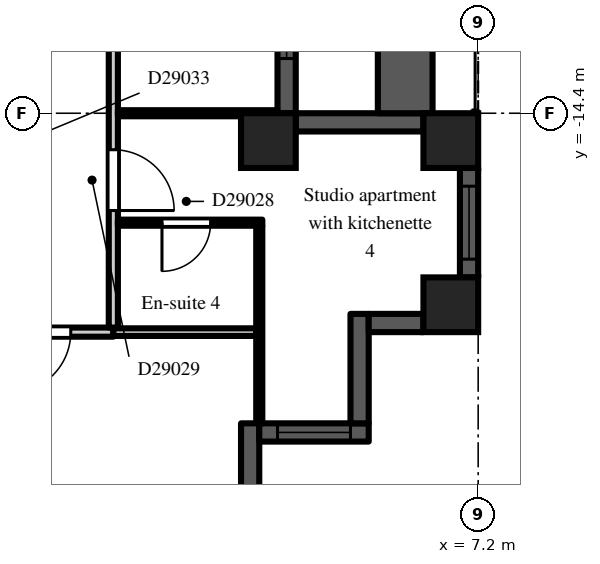
"""IFC4 building model, lengths in metres.
Left out: names, types, materials, properties, quantities, classifications, styles, units other than length and angle.
Written with IfcOpenShell. Run it as: python <this file> out.ifc"""

import sys

from ifc_helpers import new_model, si_unit, direction, frame, frame_2d, origin, origin_2d, place, context, subcontext, project, spatial, rectangle, extrude, element, fill, save


model = new_model("IFC4")
c1 = context("Model", 3, precision=1e-05, world=origin(), true_north=direction((0.0, 1.0)))
c2 = subcontext(c1, "Body", "Model", "MODEL_VIEW")
j1 = project(units=[si_unit("LENGTHUNIT", "METRE"), si_unit("PLANEANGLEUNIT", "RADIAN")], contexts=[c1])
p1 = place(None, origin())
s1 = spatial("IfcSite", under=j1, at=p1, CompositionType="ELEMENT")
p2 = place(p1, origin())
s2 = spatial("IfcBuilding", under=s1, at=p2, CompositionType="ELEMENT")
p3 = place(p2, frame((0.0, 0.0, 198.9)))
s3 = spatial("IfcBuildingStorey", under=s2, at=p3, CompositionType="ELEMENT", Elevation=198.9)
for number, where, z_axis, x_axis in (
    (1, (3.75, -14.85, 0.0), (0.0, 0.0, 1.0), (1.0, 0.0, 0.0)),
    (2, (6.75, -17.55, 0.0), (0.0, 0.0, 1.0), (1.0, 0.0, 0.0)),
    (3, (6.75, -14.85, 0.0), (0.0, 0.0, 1.0), (1.0, 0.0, 0.0)),
):
    element("IfcColumn", number, at=place(p3, frame(where, z_axis=z_axis, x_axis=x_axis)), inside=s3, PredefinedType="COLUMN", context=c2, shape_type="SweptSolid", body=[
        extrude(rectangle(XDim=0.9, YDim=0.9, at=origin_2d()), origin(), (0.0, 0.0, 1.0), 3.0),
    ])
p4 = place(p3, frame((3.45, -20.7, 0.0), z_axis=(0.0, 0.0, 1.0), x_axis=(0.0, 1.0, 0.0)))
e4 = element("IfcWall", 4, at=p4, inside=s3, PredefinedType="SOLIDWALL", context=c2, shape_type="SweptSolid", body=[
    extrude(rectangle(XDim=1.2, YDim=0.3, at=frame_2d((0.6, 0.0))), origin(), (0.0, 0.0, 1.0), 2.6),
])
p5 = place(p3, frame((3.6, -19.65, 0.0), z_axis=(0.0, 0.0, 1.0), x_axis=(1.0, 0.0, 0.0)))
e5 = element("IfcWall", 5, at=p5, inside=s3, PredefinedType="SOLIDWALL", context=c2, shape_type="SweptSolid", body=[
    extrude(rectangle(XDim=1.8, YDim=0.3, at=frame_2d((0.9, 0.0))), origin(), (0.0, 0.0, 1.0), 2.6),
])
p6 = place(p5, frame((0.3, 0.0, 0.2)))
e6 = element("IfcOpeningElement", 6, at=p6, cuts=e5, PredefinedType="OPENING", context=c2, shape_type="SweptSolid", body=[
    extrude(rectangle(XDim=1.2, YDim=1.85, at=frame_2d((0.6, 0.925))), frame((0.0, 0.16, 0.0), z_axis=(0.0, -1.0, 0.0), x_axis=(1.0, 0.0, 0.0)), (0.0, 0.0, 1.0), 0.32),
])
p7 = place(p3, frame((5.25, -19.5, 0.0), z_axis=(0.0, 0.0, 1.0), x_axis=(0.0, 1.0, 0.0)))
e7 = element("IfcWall", 7, at=p7, inside=s3, PredefinedType="SOLIDWALL", context=c2, shape_type="SweptSolid", body=[
    extrude(rectangle(XDim=1.8, YDim=0.3, at=frame_2d((0.9, 0.0))), origin(), (0.0, 0.0, 1.0), 2.6),
])
p8 = place(p3, frame((5.4, -17.85, 0.0), z_axis=(0.0, 0.0, 1.0), x_axis=(1.0, 0.0, 0.0)))
e8 = element("IfcWall", 8, at=p8, inside=s3, PredefinedType="SOLIDWALL", context=c2, shape_type="SweptSolid", body=[
    extrude(rectangle(XDim=0.9, YDim=0.3, at=frame_2d((0.45, 0.0))), origin(), (0.0, 0.0, 1.0), 2.6),
])
p9 = place(p3, frame((7.05, -17.1, 0.0), z_axis=(0.0, 0.0, 1.0), x_axis=(0.0, 1.0, 0.0)))
e9 = element("IfcWall", 9, at=p9, inside=s3, PredefinedType="SOLIDWALL", context=c2, shape_type="SweptSolid", body=[
    extrude(rectangle(XDim=1.8, YDim=0.3, at=frame_2d((0.9, 0.0))), origin(), (0.0, 0.0, 1.0), 2.3),
])
p10 = place(p9, frame((0.3, 0.0, 0.2)))
e10 = element("IfcOpeningElement", 10, at=p10, cuts=e9, PredefinedType="OPENING", context=c2, shape_type="SweptSolid", body=[
    extrude(rectangle(XDim=1.2, YDim=1.85, at=frame_2d((0.6, 0.925))), frame((0.0, 0.16, 0.0), z_axis=(0.0, -1.0, 0.0), x_axis=(1.0, 0.0, 0.0)), (0.0, 0.0, 1.0), 0.32),
])
p11 = place(p3, frame((6.3, -14.55, 0.0), z_axis=(0.0, 0.0, 1.0), x_axis=(-1.0, 0.0, 0.0)))
e11 = element("IfcWall", 11, at=p11, inside=s3, PredefinedType="SOLIDWALL", context=c2, shape_type="SweptSolid", body=[
    extrude(rectangle(XDim=2.1, YDim=0.3, at=frame_2d((1.05, 0.0))), origin(), (0.0, 0.0, 1.0), 2.3),
])
p12 = place(p3, frame((4.05, -14.4, 0.0), z_axis=(0.0, 0.0, 1.0), x_axis=(0.0, 1.0, 0.0)))
e12 = element("IfcWall", 12, at=p12, inside=s3, PredefinedType="SOLIDWALL", context=c2, shape_type="SweptSolid", body=[
    extrude(rectangle(XDim=7.2, YDim=0.3, at=frame_2d((3.6, 0.0))), origin(), (0.0, 0.0, 1.0), 2.3),
])
p13 = place(p12, frame((3.0, 0.0, 0.0)))
e13 = element("IfcOpeningElement", 13, at=p13, cuts=e12, PredefinedType="OPENING", context=c2, shape_type="SweptSolid", body=[
    extrude(rectangle(XDim=1.2, YDim=2.05, at=frame_2d((0.6, 1.025))), frame((0.0, 0.16, 0.0), z_axis=(0.0, -1.0, 0.0), x_axis=(1.0, 0.0, 0.0)), (0.0, 0.0, 1.0), 0.32),
])
p14 = place(p12, frame((0.9, 0.0, 0.2)))
e14 = element("IfcOpeningElement", 14, at=p14, cuts=e12, PredefinedType="OPENING", context=c2, shape_type="SweptSolid", body=[
    extrude(rectangle(XDim=1.8, YDim=1.85, at=frame_2d((0.9, 0.925))), frame((0.0, 0.16, 0.0), z_axis=(0.0, -1.0, 0.0), x_axis=(1.0, 0.0, 0.0)), (0.0, 0.0, 1.0), 0.32),
])
p15 = place(p12, frame((4.5, 0.0, 0.2)))
e15 = element("IfcOpeningElement", 15, at=p15, cuts=e12, PredefinedType="OPENING", context=c2, shape_type="SweptSolid", body=[
    extrude(rectangle(XDim=1.8, YDim=1.85, at=frame_2d((0.9, 0.925))), frame((0.0, 0.16, 0.0), z_axis=(0.0, -1.0, 0.0), x_axis=(1.0, 0.0, 0.0)), (0.0, 0.0, 1.0), 0.32),
])
p16 = place(p3, frame((6.0, -14.4, 0.0), z_axis=(0.0, 0.0, 1.0), x_axis=(0.0, 1.0, 0.0)))
e16 = element("IfcWall", 16, at=p16, inside=s3, PredefinedType="PARAPET", context=c2, shape_type="SweptSolid", body=[
    extrude(rectangle(XDim=7.2, YDim=0.9, at=frame_2d((3.6, 0.0))), origin(), (0.0, 0.0, 1.0), 0.8),
])
p17 = place(p3, frame((-1.2, -18.0, 0.0), z_axis=(0.0, 0.0, 1.0), x_axis=(1.0, 0.0, 0.0)))
e17 = element("IfcWall", 17, at=p17, inside=s3, PredefinedType="PARTITIONING", context=c2, shape_type="SweptSolid", body=[
    extrude(rectangle(XDim=2.4, YDim=0.15, at=frame_2d((1.2, 0.0))), origin(), (0.0, 0.0, 1.0), 2.6),
])
p18 = place(p17, frame((0.7, 0.0, 0.0)))
e18 = element("IfcOpeningElement", 18, at=p18, cuts=e17, PredefinedType="OPENING", context=c2, shape_type="SweptSolid", body=[
    extrude(rectangle(XDim=1.0, YDim=2.1, at=frame_2d((0.5, 1.05))), frame((0.0, 0.085, 0.0), z_axis=(0.0, -1.0, 0.0), x_axis=(1.0, 0.0, 0.0)), (0.0, 0.0, 1.0), 0.17),
])
p19 = place(p3, frame((1.2, -17.925, 0.0), z_axis=(0.0, 0.0, 1.0), x_axis=(0.0, 1.0, 0.0)))
e19 = element("IfcWall", 19, at=p19, inside=s3, PredefinedType="PARTITIONING", context=c2, shape_type="SweptSolid", body=[
    extrude(rectangle(XDim=16.8, YDim=0.15, at=frame_2d((8.4, 0.0))), origin(), (0.0, 0.0, 1.0), 2.6),
])
p20 = place(p19, frame((15.075, 0.0, 0.0)))
e20 = element("IfcOpeningElement", 20, at=p20, cuts=e19, PredefinedType="OPENING", context=c2, shape_type="SweptSolid", body=[
    extrude(rectangle(XDim=0.9, YDim=2.1, at=frame_2d((0.45, 1.05))), frame((0.0, 0.085, 0.0), z_axis=(0.0, -1.0, 0.0), x_axis=(1.0, 0.0, 0.0)), (0.0, 0.0, 1.0), 0.17),
])
p21 = place(p19, frame((12.075, 0.0, 0.0)))
e21 = element("IfcOpeningElement", 21, at=p21, cuts=e19, PredefinedType="OPENING", context=c2, shape_type="SweptSolid", body=[
    extrude(rectangle(XDim=0.9, YDim=2.1, at=frame_2d((0.45, 1.05))), frame((0.0, 0.085, 0.0), z_axis=(0.0, -1.0, 0.0), x_axis=(1.0, 0.0, 0.0)), (0.0, 0.0, 1.0), 0.17),
])
p22 = place(p19, frame((4.875, 0.0, 0.0)))
e22 = element("IfcOpeningElement", 22, at=p22, cuts=e19, PredefinedType="OPENING", context=c2, shape_type="SweptSolid", body=[
    extrude(rectangle(XDim=0.9, YDim=2.1, at=frame_2d((0.45, 1.05))), frame((0.0, 0.085, 0.0), z_axis=(0.0, -1.0, 0.0), x_axis=(1.0, 0.0, 0.0)), (0.0, 0.0, 1.0), 0.17),
])
p23 = place(p19, frame((1.925, 0.0, 0.0)))
e23 = element("IfcOpeningElement", 23, at=p23, cuts=e19, PredefinedType="OPENING", context=c2, shape_type="SweptSolid", body=[
    extrude(rectangle(XDim=1.0, YDim=2.1, at=frame_2d((0.5, 1.05))), frame((0.0, 0.085, 0.0), z_axis=(0.0, -1.0, 0.0), x_axis=(1.0, 0.0, 0.0)), (0.0, 0.0, 1.0), 0.17),
])
p24 = place(p3, frame((1.2, -18.0, 0.0), z_axis=(0.0, 0.0, 1.0), x_axis=(1.0, 0.0, 0.0)))
e24 = element("IfcWall", 24, at=p24, inside=s3, PredefinedType="PARTITIONING", context=c2, shape_type="SweptSolid", body=[
    extrude(rectangle(XDim=2.35, YDim=0.125, at=frame_2d((1.175, 0.0))), origin(), (0.0, 0.0, 1.0), 2.6),
])
p25 = place(p3, frame((1.275, -16.2, 0.0), z_axis=(0.0, 0.0, 1.0), x_axis=(1.0, 0.0, 0.0)))
e25 = element("IfcWall", 25, at=p25, inside=s3, PredefinedType="PARTITIONING", context=c2, shape_type="SweptSolid", body=[
    extrude(rectangle(XDim=2.375, YDim=0.1, at=frame_2d((1.188, 0.0))), origin(), (0.0, 0.0, 1.0), 2.6),
])
p26 = place(p25, frame((0.725, 0.0, 0.0)))
e26 = element("IfcOpeningElement", 26, at=p26, cuts=e25, PredefinedType="OPENING", context=c2, shape_type="SweptSolid", body=[
    extrude(rectangle(XDim=0.8, YDim=2.1, at=frame_2d((0.4, 1.05))), frame((0.0, 0.06, 0.0), z_axis=(0.0, -1.0, 0.0), x_axis=(1.0, 0.0, 0.0)), (0.0, 0.0, 1.0), 0.12),
])
p27 = place(p3, frame((1.275, -14.4, 0.0), z_axis=(0.0, 0.0, 1.0), x_axis=(1.0, 0.0, 0.0)))
e27 = element("IfcWall", 27, at=p27, inside=s3, PredefinedType="PARTITIONING", context=c2, shape_type="SweptSolid", body=[
    extrude(rectangle(XDim=2.625, YDim=0.1, at=frame_2d((1.312, 0.0))), origin(), (0.0, 0.0, 1.0), 2.6),
])
p28 = place(p3, frame((3.6, -19.5, 0.0), z_axis=(0.0, 0.0, 1.0), x_axis=(0.0, 1.0, 0.0)))
e28 = element("IfcWall", 28, at=p28, inside=s3, PredefinedType="PARTITIONING", context=c2, shape_type="SweptSolid", body=[
    extrude(rectangle(XDim=3.25, YDim=0.1, at=frame_2d((1.625, 0.0))), origin(), (0.0, 0.0, 1.0), 2.6),
])
p29 = place(p6, origin())
e29 = element("IfcWindow", 29, at=p29, inside=s3, PartitioningType="SINGLE_PANEL", PredefinedType="WINDOW", context=c2, shape_type="SweptSolid", body=[
    extrude(rectangle(XDim=1.2, YDim=1.85, at=frame_2d((0.6, 0.925))), frame((0.0, 0.03, 0.0), z_axis=(0.0, -1.0, 0.0), x_axis=(1.0, 0.0, 0.0)), (0.0, 0.0, 1.0), 0.06),
])
fill(e6, e29)
p30 = place(p10, origin())
e30 = element("IfcWindow", 30, at=p30, inside=s3, PartitioningType="SINGLE_PANEL", PredefinedType="WINDOW", context=c2, shape_type="SweptSolid", body=[
    extrude(rectangle(XDim=1.2, YDim=1.85, at=frame_2d((0.6, 0.925))), frame((0.0, 0.03, 0.0), z_axis=(0.0, -1.0, 0.0), x_axis=(1.0, 0.0, 0.0)), (0.0, 0.0, 1.0), 0.06),
])
fill(e10, e30)
p31 = place(p14, origin())
e31 = element("IfcWindow", 31, at=p31, inside=s3, PartitioningType="SINGLE_PANEL", PredefinedType="WINDOW", context=c2, shape_type="SweptSolid", body=[
    extrude(rectangle(XDim=1.8, YDim=1.85, at=frame_2d((0.9, 0.925))), frame((0.0, 0.03, 0.0), z_axis=(0.0, -1.0, 0.0), x_axis=(1.0, 0.0, 0.0)), (0.0, 0.0, 1.0), 0.06),
])
fill(e14, e31)
p32 = place(p18, frame((1.0, 0.0, 0.0), z_axis=(0.0, 0.0, 1.0), x_axis=(-1.0, 0.0, 0.0)))
e32 = element("IfcDoor", 32, at=p32, inside=s3, OperationType="SINGLE_SWING_RIGHT", PredefinedType="DOOR", context=c2, shape_type="SweptSolid", body=[
    extrude(rectangle(XDim=1.0, YDim=2.1, at=frame_2d((0.5, 1.05))), frame((0.0, 0.025, 0.0), z_axis=(0.0, -1.0, 0.0), x_axis=(1.0, 0.0, 0.0)), (0.0, 0.0, 1.0), 0.05),
])
fill(e18, e32)
p33 = place(p26, frame((0.8, 0.0, 0.0), z_axis=(0.0, 0.0, 1.0), x_axis=(-1.0, 0.0, 0.0)))
e33 = element("IfcDoor", 33, at=p33, inside=s3, OperationType="SINGLE_SWING_RIGHT", PredefinedType="DOOR", context=c2, shape_type="SweptSolid", body=[
    extrude(rectangle(XDim=0.8, YDim=2.1, at=frame_2d((0.4, 1.05))), frame((0.0, 0.025, 0.0), z_axis=(0.0, -1.0, 0.0), x_axis=(1.0, 0.0, 0.0)), (0.0, 0.0, 1.0), 0.05),
])
fill(e26, e33)
p34 = place(p23, frame((1.0, 0.0, 0.0), z_axis=(0.0, 0.0, 1.0), x_axis=(-1.0, 0.0, 0.0)))
e34 = element("IfcDoor", 34, at=p34, inside=s3, OperationType="SINGLE_SWING_RIGHT", PredefinedType="DOOR", context=c2, shape_type="SweptSolid", body=[
    extrude(rectangle(XDim=1.0, YDim=2.1, at=frame_2d((0.5, 1.05))), frame((0.0, 0.025, 0.0), z_axis=(0.0, -1.0, 0.0), x_axis=(1.0, 0.0, 0.0)), (0.0, 0.0, 1.0), 0.05),
])
fill(e23, e34)
save(model, sys.argv[1])
